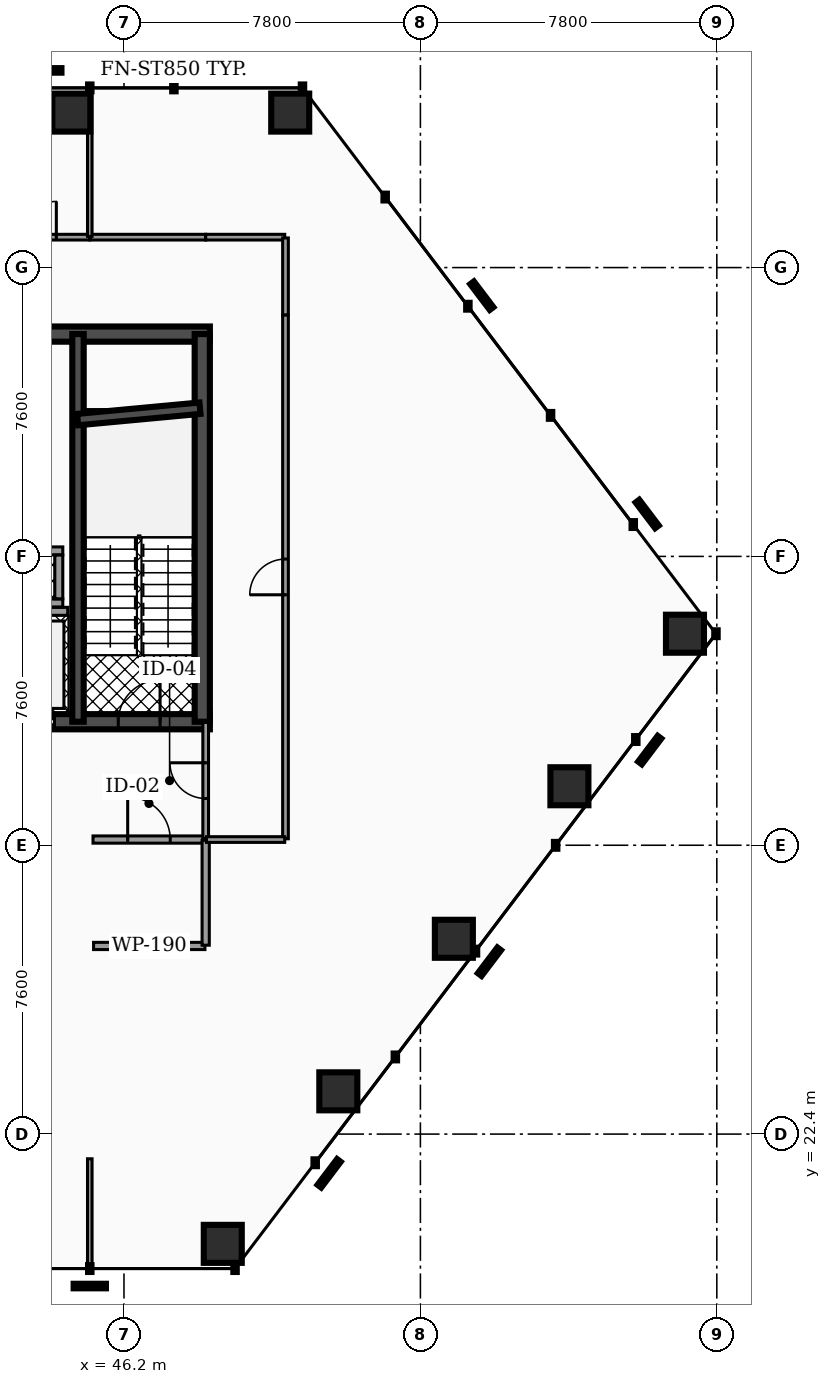
"""IFC4 building model, lengths in metres.
Left out: names, types, materials, properties, quantities, classifications, styles, units other than length and angle.
Written with IfcOpenShell. Run it as: python <this file> out.ifc"""

import sys

from ifc_helpers import new_model, si_unit, direction, frame, frame_2d, origin, origin_2d, place, context, subcontext, project, spatial, rectangle, hollow_rectangle, extrude, element, fill, save


model = new_model("IFC4")
c1 = context("Model", 3, precision=1e-05, world=origin(), true_north=direction((0.0, 1.0)))
c2 = subcontext(c1, "Body", "Model", "MODEL_VIEW")
j1 = project(units=[si_unit("LENGTHUNIT", "METRE"), si_unit("PLANEANGLEUNIT", "RADIAN")], contexts=[c1])
p1 = place(None, origin())
s1 = spatial("IfcSite", under=j1, at=p1, CompositionType="ELEMENT")
p2 = place(p1, origin())
s2 = spatial("IfcBuilding", under=s1, at=p2, CompositionType="ELEMENT")
p3 = place(p2, frame((0.0, 0.0, 60.18)))
s3 = spatial("IfcBuildingStorey", under=s2, at=p3, CompositionType="ELEMENT", Elevation=60.18)
p4 = place(p3, frame((28.4, 43.45, 0.0), z_axis=(0.0, 0.0, 1.0), x_axis=(1.0, 0.0, 0.0)))
e1 = element("IfcWall", 1, at=p4, inside=s3, PredefinedType="SHEAR", context=c2, shape_type="SweptSolid", body=[
    extrude(rectangle(XDim=20.06, YDim=0.4, at=frame_2d((10.03, 0.0))), origin(), (0.0, 0.0, 1.0), 3.82),
])
p5 = place(p3, frame((28.4, 33.25, 0.0), z_axis=(0.0, 0.0, 1.0), x_axis=(1.0, 0.0, 0.0)))
e2 = element("IfcWall", 2, at=p5, inside=s3, PredefinedType="SHEAR", context=c2, shape_type="SweptSolid", body=[
    extrude(rectangle(XDim=20.06, YDim=0.4, at=frame_2d((10.03, 0.0))), origin(), (0.0, 0.0, 1.0), 3.82),
])
p6 = place(p5, frame((4.03, 0.0, 0.0)))
e3 = element("IfcOpeningElement", 3, at=p6, cuts=e2, PredefinedType="OPENING", context=c2, shape_type="SweptSolid", body=[
    extrude(rectangle(XDim=1.1, YDim=2.15, at=frame_2d((0.55, 1.075))), frame((0.0, 0.21, 0.0), z_axis=(0.0, -1.0, 0.0), x_axis=(1.0, 0.0, 0.0)), (0.0, 0.0, 1.0), 0.42),
])
p7 = place(p5, frame((14.87, 0.0, 0.0)))
e4 = element("IfcOpeningElement", 4, at=p7, cuts=e2, PredefinedType="OPENING", context=c2, shape_type="SweptSolid", body=[
    extrude(rectangle(XDim=1.1, YDim=2.15, at=frame_2d((0.55, 1.075))), frame((0.0, 0.21, 0.0), z_axis=(0.0, -1.0, 0.0), x_axis=(1.0, 0.0, 0.0)), (0.0, 0.0, 1.0), 0.42),
])
p8 = place(p5, frame((1.31, 0.0, 0.0)))
e5 = element("IfcOpeningElement", 5, at=p8, cuts=e2, PredefinedType="OPENING", context=c2, shape_type="SweptSolid", body=[
    extrude(rectangle(XDim=1.1, YDim=2.2, at=frame_2d((0.55, 1.1))), frame((0.0, 0.21, 0.0), z_axis=(0.0, -1.0, 0.0), x_axis=(1.0, 0.0, 0.0)), (0.0, 0.0, 1.0), 0.42),
])
p9 = place(p5, frame((9.44, 0.0, 0.0)))
e6 = element("IfcOpeningElement", 6, at=p9, cuts=e2, PredefinedType="OPENING", context=c2, shape_type="SweptSolid", body=[
    extrude(rectangle(XDim=1.12, YDim=2.05, at=frame_2d((0.56, 1.025))), frame((0.0, 0.21, 0.0), z_axis=(0.0, -1.0, 0.0), x_axis=(1.0, 0.0, 0.0)), (0.0, 0.0, 1.0), 0.42),
])
p10 = place(p5, frame((17.65, 0.0, 0.0)))
e7 = element("IfcOpeningElement", 7, at=p10, cuts=e2, PredefinedType="OPENING", context=c2, shape_type="SweptSolid", body=[
    extrude(rectangle(XDim=1.1, YDim=2.2, at=frame_2d((0.55, 1.1))), frame((0.0, 0.21, 0.0), z_axis=(0.0, -1.0, 0.0), x_axis=(1.0, 0.0, 0.0)), (0.0, 0.0, 1.0), 0.42),
])
p11 = place(p3, frame((44.99, 33.25, 0.0), z_axis=(0.0, 0.0, 1.0), x_axis=(0.0, 1.0, 0.0)))
e8 = element("IfcWall", 8, at=p11, inside=s3, PredefinedType="SHEAR", context=c2, shape_type="SweptSolid", body=[
    extrude(rectangle(XDim=10.2, YDim=0.3, at=frame_2d((5.1, 0.0))), origin(), (0.0, 0.0, 1.0), 3.82),
])
p12 = place(p3, frame((48.26, 33.25, 0.0), z_axis=(0.0, 0.0, 1.0), x_axis=(0.0, 1.0, 0.0)))
e9 = element("IfcWall", 9, at=p12, inside=s3, PredefinedType="SHEAR", context=c2, shape_type="SweptSolid", body=[
    extrude(rectangle(XDim=10.2, YDim=0.4, at=frame_2d((5.1, 0.0))), origin(), (0.0, 0.0, 1.0), 3.82),
])
p13 = place(p3, frame((44.98, 41.2, 0.0), z_axis=(0.0, 0.0, 1.0), x_axis=(0.995686468965, 0.09278176286, 0.0)))
e10 = element("IfcWall", 10, at=p13, inside=s3, PredefinedType="SHEAR", context=c2, shape_type="SweptSolid", body=[
    extrude(rectangle(XDim=3.234, YDim=0.3, at=frame_2d((1.617, 0.0))), origin(), (0.0, 0.0, 1.0), 3.82),
])
p14 = place(p3, frame((50.574, 49.278, 0.0), z_axis=(0.136996695785, -0.030246845536, 0.990109606902), x_axis=(0.215593078427, 0.97648329455, 0.0)))
e11 = element("IfcColumn", 11, at=p14, inside=s3, PredefinedType="COLUMN", context=c2, shape_type="SweptSolid", body=[
    extrude(hollow_rectangle(XDim=1.0, YDim=1.0, WallThickness=0.05, at=origin_2d()), origin(), (0.0, 0.0, 1.0), 3.858),
])
p15 = place(p3, frame((44.814, 49.278, 0.0), z_axis=(0.06603544919, -0.030468093352, 0.997352001421), x_axis=(0.41894701377, 0.908010682565, 0.0)))
e12 = element("IfcColumn", 12, at=p15, inside=s3, PredefinedType="COLUMN", context=c2, shape_type="SweptSolid", body=[
    extrude(hollow_rectangle(XDim=1.0, YDim=1.0, WallThickness=0.05, at=origin_2d()), origin(), (0.0, 0.0, 1.0), 3.83),
])
p16 = place(p3, frame((48.8, 19.512, 0.0), z_axis=(-0.090432989759, -0.040446822424, 0.995080865517), x_axis=(0.408281600663, -0.912856031672, 0.0)))
e13 = element("IfcColumn", 13, at=p16, inside=s3, PredefinedType="COLUMN", context=c2, shape_type="SweptSolid", body=[
    extrude(hollow_rectangle(XDim=1.0, YDim=1.0, WallThickness=0.05, at=origin_2d()), origin(), (0.0, 0.0, 1.0), 3.839),
])
p17 = place(p3, frame((51.84, 23.525, 0.0), z_axis=(-0.061174840533, -0.001530965769, 0.998125891373), x_axis=(0.025018235536, -0.999686994959, 0.0)))
e14 = element("IfcColumn", 14, at=p17, inside=s3, PredefinedType="COLUMN", context=c2, shape_type="SweptSolid", body=[
    extrude(hollow_rectangle(XDim=1.0, YDim=1.0, WallThickness=0.05, at=origin_2d()), origin(), (0.0, 0.0, 1.0), 3.827),
])
p18 = place(p3, frame((54.881, 27.539, 0.0), z_axis=(-0.03159735819, 0.037533831547, 0.998795684034), x_axis=(-0.76501240422, -0.644015544369, 0.0)))
e15 = element("IfcColumn", 15, at=p18, inside=s3, PredefinedType="COLUMN", context=c2, shape_type="SweptSolid", body=[
    extrude(hollow_rectangle(XDim=1.0, YDim=1.0, WallThickness=0.05, at=origin_2d()), origin(), (0.0, 0.0, 1.0), 3.825),
])
p19 = place(p3, frame((57.921, 31.552, 0.0), z_axis=(-0.002039138207, 0.076403959698, 0.997074860208), x_axis=(-0.99964404126, -0.026679407273, 0.0)))
e16 = element("IfcColumn", 16, at=p19, inside=s3, PredefinedType="COLUMN", context=c2, shape_type="SweptSolid", body=[
    extrude(hollow_rectangle(XDim=1.0, YDim=1.0, WallThickness=0.05, at=origin_2d()), origin(), (0.0, 0.0, 1.0), 3.831),
])
p20 = place(p3, frame((60.962, 35.566, 0.0), z_axis=(0.027352114737, 0.114993113466, 0.992989650336), x_axis=(-0.972858036627, 0.23140276699, 0.0)))
e17 = element("IfcColumn", 17, at=p20, inside=s3, PredefinedType="COLUMN", context=c2, shape_type="SweptSolid", body=[
    extrude(hollow_rectangle(XDim=1.0, YDim=1.0, WallThickness=0.05, at=origin_2d()), origin(), (0.0, 0.0, 1.0), 3.847),
])
p21 = place(p3, frame((42.92, 36.155, 0.0), z_axis=(0.0, 0.0, 1.0), x_axis=(1.0, 0.0, 0.0)))
e18 = element("IfcWall", 18, at=p21, inside=s3, PredefinedType="SOLIDWALL", context=c2, shape_type="SweptSolid", body=[
    extrude(rectangle(XDim=1.8, YDim=0.21, at=frame_2d((0.9, 0.0))), origin(), (0.0, 0.0, 1.0), 2.792),
])
for number, where, z_axis, x_axis in (
    (19, (42.99, 36.375, 0.0), (0.0, 0.0, 1.0), (1.0, 0.0, 0.0)),
    (20, (42.99, 37.745, 0.0), (0.0, 0.0, 1.0), (1.0, 0.0, 0.0)),
):
    element("IfcWall", number, at=place(p3, frame(where, z_axis=z_axis, x_axis=x_axis)), inside=s3, PredefinedType="SOLIDWALL", context=c2, shape_type="SweptSolid", body=[
        extrude(rectangle(XDim=1.6, YDim=0.21, at=frame_2d((0.8, 0.0))), origin(), (0.0, 0.0, 1.0), 3.82),
    ])
p22 = place(p3, frame((44.485, 36.485, 0.0), z_axis=(0.0, 0.0, 1.0), x_axis=(0.0, 1.0, 0.0)))
e21 = element("IfcWall", 21, at=p22, inside=s3, PredefinedType="SOLIDWALL", context=c2, shape_type="SweptSolid", body=[
    extrude(rectangle(XDim=1.15, YDim=0.21, at=frame_2d((0.575, 0.0))), origin(), (0.0, 0.0, 1.0), 3.82),
])
p23 = place(p3, frame((45.385, 30.15, 0.0), z_axis=(0.0, 0.0, 1.0), x_axis=(1.0, 0.0, 0.0)))
e22 = element("IfcWall", 22, at=p23, inside=s3, PredefinedType="PARTITIONING", context=c2, shape_type="SweptSolid", body=[
    extrude(rectangle(XDim=2.945, YDim=0.19, at=frame_2d((1.473, 0.0))), origin(), (0.0, 0.0, 1.0), 2.777),
])
p24 = place(p23, frame((0.913, 0.0, 0.0)))
e23 = element("IfcOpeningElement", 23, at=p24, cuts=e22, PredefinedType="OPENING", context=c2, shape_type="SweptSolid", body=[
    extrude(rectangle(XDim=1.12, YDim=2.05, at=frame_2d((0.56, 1.025))), frame((0.0, 0.105, 0.0), z_axis=(0.0, -1.0, 0.0), x_axis=(1.0, 0.0, 0.0)), (0.0, 0.0, 1.0), 0.21),
])
p25 = place(p3, frame((48.35, 30.17, 0.0), z_axis=(0.0, 0.0, 1.0), x_axis=(0.0, 1.0, 0.0)))
e24 = element("IfcWall", 24, at=p25, inside=s3, PredefinedType="PARTITIONING", context=c2, shape_type="SweptSolid", body=[
    extrude(rectangle(XDim=3.06, YDim=0.15, at=frame_2d((1.53, 0.0))), origin(), (0.0, 0.0, 1.0), 2.777),
])
p26 = place(p25, frame((1.06, 0.0, 0.0)))
e25 = element("IfcOpeningElement", 25, at=p26, cuts=e24, PredefinedType="OPENING", context=c2, shape_type="SweptSolid", body=[
    extrude(rectangle(XDim=0.94, YDim=2.05, at=frame_2d((0.47, 1.025))), frame((0.0, 0.085, 0.0), z_axis=(0.0, -1.0, 0.0), x_axis=(1.0, 0.0, 0.0)), (0.0, 0.0, 1.0), 0.17),
])
p27 = place(p3, frame((45.4, 27.35, 0.0), z_axis=(0.0, 0.0, 1.0), x_axis=(1.0, 0.0, 0.0)))
e26 = element("IfcWall", 26, at=p27, inside=s3, PredefinedType="PARTITIONING", context=c2, shape_type="SweptSolid", body=[
    extrude(rectangle(XDim=2.93, YDim=0.19, at=frame_2d((1.465, 0.0))), origin(), (0.0, 0.0, 1.0), 2.777),
])
p28 = place(p3, frame((48.35, 27.37, 0.0), z_axis=(0.0, 0.0, 1.0), x_axis=(0.0, 1.0, 0.0)))
e27 = element("IfcWall", 27, at=p28, inside=s3, PredefinedType="PARTITIONING", context=c2, shape_type="SweptSolid", body=[
    extrude(rectangle(XDim=2.76, YDim=0.19, at=frame_2d((1.38, 0.0))), origin(), (0.0, 0.0, 1.0), 2.777),
])
p29 = place(p3, frame((45.305, 46.0, 0.0), z_axis=(0.0, 0.0, 1.0), x_axis=(1.0, 0.0, 0.0)))
e28 = element("IfcWall", 28, at=p29, inside=s3, PredefinedType="PARTITIONING", context=c2, shape_type="SweptSolid", body=[
    extrude(rectangle(XDim=3.045, YDim=0.15, at=frame_2d((1.522, 0.0))), origin(), (0.0, 0.0, 1.0), 2.777),
])
p30 = place(p3, frame((48.35, 46.0, 0.0), z_axis=(0.0, 0.0, 1.0), x_axis=(1.0, 0.0, 0.0)))
e29 = element("IfcWall", 29, at=p30, inside=s3, PredefinedType="PARTITIONING", context=c2, shape_type="SweptSolid", body=[
    extrude(rectangle(XDim=2.08, YDim=0.15, at=frame_2d((1.04, 0.0))), origin(), (0.0, 0.0, 1.0), 2.777),
])
p31 = place(p3, frame((50.45, 43.95, 0.0), z_axis=(0.0, 0.0, 1.0), x_axis=(0.0, 1.0, 0.0)))
e30 = element("IfcWall", 30, at=p31, inside=s3, PredefinedType="PARTITIONING", context=c2, shape_type="SweptSolid", body=[
    extrude(rectangle(XDim=2.03, YDim=0.15, at=frame_2d((1.015, 0.0))), origin(), (0.0, 0.0, 1.0), 2.777),
])
p32 = place(p3, frame((50.45, 30.17, 0.0), z_axis=(0.0, 0.0, 1.0), x_axis=(0.0, 1.0, 0.0)))
e31 = element("IfcWall", 31, at=p32, inside=s3, PredefinedType="PARTITIONING", context=c2, shape_type="SweptSolid", body=[
    extrude(rectangle(XDim=13.78, YDim=0.15, at=frame_2d((6.89, 0.0))), origin(), (0.0, 0.0, 1.0), 2.777),
])
p33 = place(p32, frame((6.42, 0.0, 0.0)))
e32 = element("IfcOpeningElement", 32, at=p33, cuts=e31, PredefinedType="OPENING", context=c2, shape_type="SweptSolid", body=[
    extrude(rectangle(XDim=0.94, YDim=2.05, at=frame_2d((0.47, 1.025))), frame((0.0, 0.085, 0.0), z_axis=(0.0, -1.0, 0.0), x_axis=(1.0, 0.0, 0.0)), (0.0, 0.0, 1.0), 0.17),
])
p34 = place(p3, frame((48.37, 30.15, 0.0), z_axis=(0.0, 0.0, 1.0), x_axis=(1.0, 0.0, 0.0)))
e33 = element("IfcWall", 33, at=p34, inside=s3, PredefinedType="PARTITIONING", context=c2, shape_type="SweptSolid", body=[
    extrude(rectangle(XDim=2.06, YDim=0.15, at=frame_2d((1.03, 0.0))), origin(), (0.0, 0.0, 1.0), 2.777),
])
p35 = place(p3, frame((42.605, 46.0, 0.0), z_axis=(0.0, 0.0, 1.0), x_axis=(1.0, 0.0, 0.0)))
e34 = element("IfcWall", 34, at=p35, inside=s3, PredefinedType="PARTITIONING", context=c2, shape_type="SweptSolid", body=[
    extrude(rectangle(XDim=2.69, YDim=0.15, at=frame_2d((1.345, 0.0))), origin(), (0.0, 0.0, 1.0), 2.777),
])
p36 = place(p35, frame((0.875, 0.0, 0.0)))
e35 = element("IfcOpeningElement", 35, at=p36, cuts=e34, PredefinedType="OPENING", context=c2, shape_type="SweptSolid", body=[
    extrude(rectangle(XDim=0.94, YDim=2.05, at=frame_2d((0.47, 1.025))), frame((0.0, 0.085, 0.0), z_axis=(0.0, -1.0, 0.0), x_axis=(1.0, 0.0, 0.0)), (0.0, 0.0, 1.0), 0.17),
])
p37 = place(p3, frame((45.3, 18.877, 0.0), z_axis=(0.0, 0.0, 1.0), x_axis=(0.0, 1.0, 0.0)))
e36 = element("IfcWall", 36, at=p37, inside=s3, PredefinedType="PARTITIONING", context=c2, shape_type="SweptSolid", body=[
    extrude(rectangle(XDim=2.873, YDim=0.12, at=frame_2d((1.437, 0.0))), origin(), (0.0, 0.0, 1.0), 2.777),
])
p38 = place(p3, frame((45.3, 46.02, 0.0), z_axis=(0.0, 0.0, 1.0), x_axis=(0.0, 1.0, 0.0)))
e37 = element("IfcWall", 37, at=p38, inside=s3, PredefinedType="PARTITIONING", context=c2, shape_type="SweptSolid", body=[
    extrude(rectangle(XDim=3.893, YDim=0.12, at=frame_2d((1.946, 0.0))), origin(), (0.0, 0.0, 1.0), 2.777),
])
p39 = place(p7, origin())
e38 = element("IfcDoor", 38, at=p39, inside=s3, OperationType="SLIDING_TO_RIGHT", PredefinedType="DOOR", context=c2, shape_type="SweptSolid", body=[
    extrude(rectangle(XDim=1.1, YDim=2.15, at=frame_2d((0.55, 1.075))), frame((0.0, 0.025, 0.0), z_axis=(0.0, -1.0, 0.0), x_axis=(1.0, 0.0, 0.0)), (0.0, 0.0, 1.0), 0.05),
])
fill(e4, e38)
p40 = place(p10, origin())
e39 = element("IfcDoor", 39, at=p40, inside=s3, OperationType="SINGLE_SWING_RIGHT", PredefinedType="DOOR", context=c2, shape_type="SweptSolid", body=[
    extrude(rectangle(XDim=1.1, YDim=2.2, at=frame_2d((0.55, 1.1))), frame((0.0, 0.025, 0.0), z_axis=(0.0, -1.0, 0.0), x_axis=(1.0, 0.0, 0.0)), (0.0, 0.0, 1.0), 0.05),
])
fill(e7, e39)
p41 = place(p24, origin())
e40 = element("IfcDoor", 40, at=p41, inside=s3, OperationType="SINGLE_SWING_LEFT", PredefinedType="DOOR", context=c2, shape_type="SweptSolid", body=[
    extrude(rectangle(XDim=1.12, YDim=2.05, at=frame_2d((0.56, 1.025))), frame((0.0, 0.025, 0.0), z_axis=(0.0, -1.0, 0.0), x_axis=(1.0, 0.0, 0.0)), (0.0, 0.0, 1.0), 0.05),
])
fill(e23, e40)
p42 = place(p26, origin())
e41 = element("IfcDoor", 41, at=p42, inside=s3, OperationType="SINGLE_SWING_RIGHT", PredefinedType="DOOR", context=c2, shape_type="SweptSolid", body=[
    extrude(rectangle(XDim=0.94, YDim=2.05, at=frame_2d((0.47, 1.025))), frame((0.0, 0.025, 0.0), z_axis=(0.0, -1.0, 0.0), x_axis=(1.0, 0.0, 0.0)), (0.0, 0.0, 1.0), 0.05),
])
fill(e25, e41)
p43 = place(p33, origin())
e42 = element("IfcDoor", 42, at=p43, inside=s3, OperationType="SINGLE_SWING_LEFT", PredefinedType="DOOR", context=c2, shape_type="SweptSolid", body=[
    extrude(rectangle(XDim=0.94, YDim=2.05, at=frame_2d((0.47, 1.025))), frame((0.0, 0.025, 0.0), z_axis=(0.0, -1.0, 0.0), x_axis=(1.0, 0.0, 0.0)), (0.0, 0.0, 1.0), 0.05),
])
fill(e32, e42)
p44 = place(p36, origin())
e43 = element("IfcDoor", 43, at=p44, inside=s3, OperationType="SINGLE_SWING_RIGHT", PredefinedType="DOOR", context=c2, shape_type="SweptSolid", body=[
    extrude(rectangle(XDim=0.94, YDim=2.05, at=frame_2d((0.47, 1.025))), frame((0.0, 0.025, 0.0), z_axis=(0.0, -1.0, 0.0), x_axis=(1.0, 0.0, 0.0)), (0.0, 0.0, 1.0), 0.05),
])
fill(e35, e43)
save(model, sys.argv[1])
